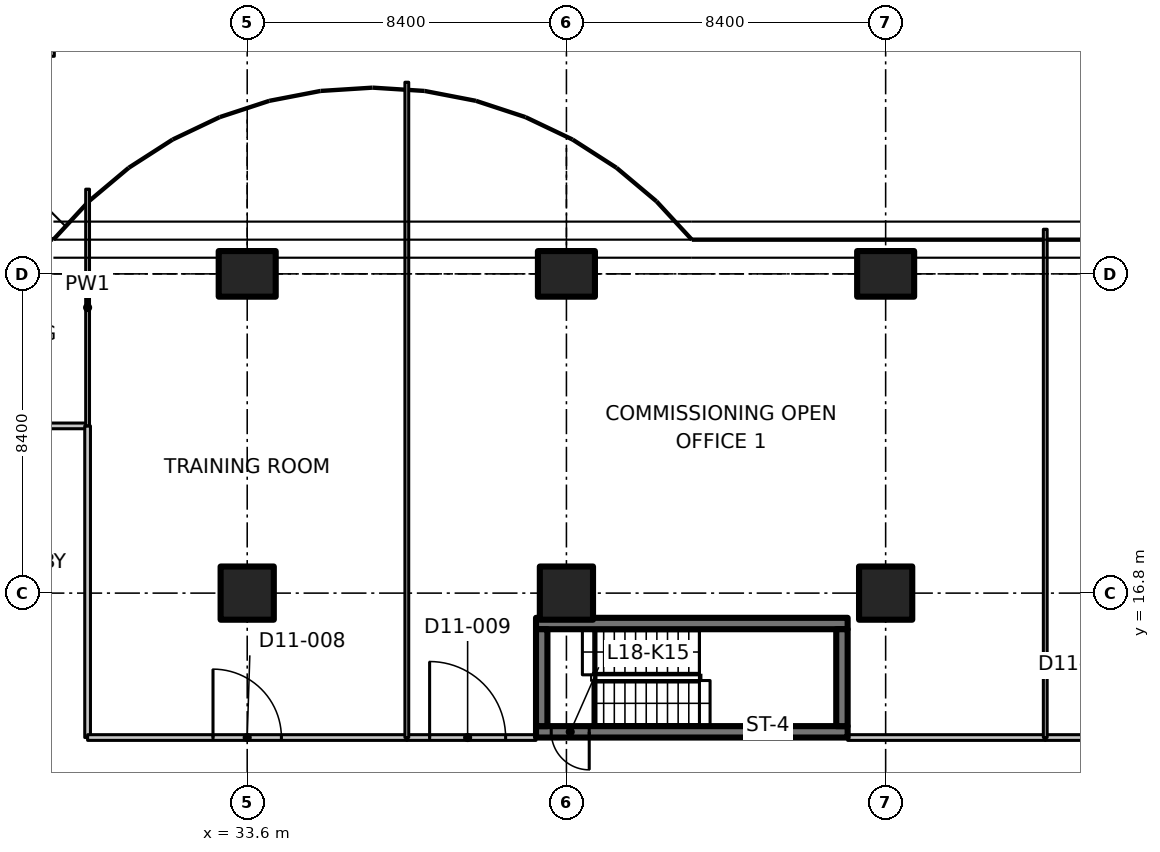
"""IFC4 building model, lengths in metres.
Left out: names, types, materials, properties, quantities, classifications, styles, units other than length and angle.
Written with IfcOpenShell. Run it as: python <this file> out.ifc"""

import sys

from ifc_helpers import new_model, si_unit, direction, frame, frame_2d, origin, origin_2d, place, context, subcontext, project, spatial, polyline, rectangle, outline, extrude, element, fill, save


model = new_model("IFC4")
c1 = context("Model", 3, precision=1e-05, world=origin(), true_north=direction((0.0, 1.0)))
c2 = subcontext(c1, "Body", "Model", "MODEL_VIEW")
j1 = project(units=[si_unit("LENGTHUNIT", "METRE"), si_unit("PLANEANGLEUNIT", "RADIAN")], contexts=[c1])
p1 = place(None, origin())
s1 = spatial("IfcSite", under=j1, at=p1, CompositionType="ELEMENT")
p2 = place(p1, origin())
s2 = spatial("IfcBuilding", under=s1, at=p2, CompositionType="ELEMENT")
p3 = place(p2, frame((0.0, 0.0, 79.7)))
s3 = spatial("IfcBuildingStorey", under=s2, at=p3, CompositionType="ELEMENT", Elevation=79.7)
p4 = place(p3, frame((33.6, 16.8, 0.0), z_axis=(0.0, 0.0, 1.0), x_axis=(1.0, 0.0, 0.0)))
e1 = element("IfcColumn", 1, at=p4, inside=s3, PredefinedType="COLUMN", context=c2, shape_type="SweptSolid", body=[
    extrude(rectangle(XDim=1.4, YDim=1.4, at=origin_2d()), origin(), (0.0, 0.0, 1.0), 3.35),
])
p5 = place(p3, frame((33.6, 25.2, 0.0), z_axis=(0.0, 0.0, 1.0), x_axis=(0.0, 1.0, 0.0)))
e2 = element("IfcColumn", 2, at=p5, inside=s3, PredefinedType="COLUMN", context=c2, shape_type="SweptSolid", body=[
    extrude(rectangle(XDim=1.2, YDim=1.5, at=origin_2d()), origin(), (0.0, 0.0, 1.0), 3.35),
])
p6 = place(p3, frame((42.0, 16.8, 0.0), z_axis=(0.0, 0.0, 1.0), x_axis=(1.0, 0.0, 0.0)))
e3 = element("IfcColumn", 3, at=p6, inside=s3, PredefinedType="COLUMN", context=c2, shape_type="SweptSolid", body=[
    extrude(rectangle(XDim=1.4, YDim=1.4, at=origin_2d()), origin(), (0.0, 0.0, 1.0), 3.35),
])
p7 = place(p3, frame((42.0, 25.2, 0.0), z_axis=(0.0, 0.0, 1.0), x_axis=(0.0, 1.0, 0.0)))
e4 = element("IfcColumn", 4, at=p7, inside=s3, PredefinedType="COLUMN", context=c2, shape_type="SweptSolid", body=[
    extrude(rectangle(XDim=1.2, YDim=1.5, at=origin_2d()), origin(), (0.0, 0.0, 1.0), 3.35),
])
p8 = place(p3, frame((50.4, 16.8, 0.0), z_axis=(0.0, 0.0, 1.0), x_axis=(1.0, 0.0, 0.0)))
e5 = element("IfcColumn", 5, at=p8, inside=s3, PredefinedType="COLUMN", context=c2, shape_type="SweptSolid", body=[
    extrude(rectangle(XDim=1.4, YDim=1.4, at=origin_2d()), origin(), (0.0, 0.0, 1.0), 3.35),
])
p9 = place(p3, frame((50.4, 25.2, 0.0), z_axis=(0.0, 0.0, 1.0), x_axis=(0.0, 1.0, 0.0)))
e6 = element("IfcColumn", 6, at=p9, inside=s3, PredefinedType="COLUMN", context=c2, shape_type="SweptSolid", body=[
    extrude(rectangle(XDim=1.2, YDim=1.5, at=origin_2d()), origin(), (0.0, 0.0, 1.0), 3.35),
])
p10 = place(p3, frame((49.4, 13.15, 0.0), z_axis=(0.0, 0.0, 1.0), x_axis=(-1.0, 0.0, 0.0)))
e7 = element("IfcWall", 7, at=p10, inside=s3, PredefinedType="SHEAR", context=c2, shape_type="SweptSolid", body=[
    extrude(rectangle(XDim=8.2, YDim=0.3, at=frame_2d((4.1, 0.0))), origin(), (0.0, 0.0, 1.0), 3.35),
])
p11 = place(p10, frame((6.8, 0.0, 0.0)))
e8 = element("IfcOpeningElement", 8, at=p11, cuts=e7, PredefinedType="OPENING", context=c2, shape_type="SweptSolid", body=[
    extrude(rectangle(XDim=1.0, YDim=2.1, at=frame_2d((0.5, 1.05))), frame((0.0, 0.16, 0.0), z_axis=(0.0, -1.0, 0.0), x_axis=(1.0, 0.0, 0.0)), (0.0, 0.0, 1.0), 0.32),
])
p12 = place(p3, frame((41.2, 16.0, 0.0), z_axis=(0.0, 0.0, 1.0), x_axis=(1.0, 0.0, 0.0)))
e9 = element("IfcWall", 9, at=p12, inside=s3, PredefinedType="SHEAR", context=c2, shape_type="SweptSolid", body=[
    extrude(rectangle(XDim=8.2, YDim=0.3, at=frame_2d((4.1, 0.0))), origin(), (0.0, 0.0, 1.0), 3.35),
])
for number, where, z_axis, x_axis in (
    (10, (41.35, 13.3, 0.0), (0.0, 0.0, 1.0), (0.0, 1.0, 0.0)),
    (11, (49.25, 13.3, 0.0), (0.0, 0.0, 1.0), (0.0, 1.0, 0.0)),
):
    element("IfcWall", number, at=place(p3, frame(where, z_axis=z_axis, x_axis=x_axis)), inside=s3, PredefinedType="SHEAR", context=c2, shape_type="SweptSolid", body=[
        extrude(rectangle(XDim=2.55, YDim=0.3, at=frame_2d((1.275, 0.0))), origin(), (0.0, 0.0, 1.0), 3.35),
    ])
p13 = place(p3, frame((25.2, 21.2, 0.0), z_axis=(0.0, 0.0, 1.0), x_axis=(1.0, 0.0, 0.0)))
e12 = element("IfcWall", 12, at=p13, inside=s3, PredefinedType="PARTITIONING", context=c2, shape_type="SweptSolid", body=[
    extrude(rectangle(XDim=4.2, YDim=0.15, at=frame_2d((2.1, 0.0))), origin(), (0.0, 0.0, 1.0), 3.33),
])
p14 = place(p3, frame((29.4, 21.2, 0.0), z_axis=(0.0, 0.0, 1.0), x_axis=(0.0, -1.0, 0.0)))
e13 = element("IfcWall", 13, at=p14, inside=s3, PredefinedType="PARTITIONING", context=c2, shape_type="SweptSolid", body=[
    extrude(rectangle(XDim=8.2, YDim=0.15, at=frame_2d((4.1, 0.0))), origin(), (0.0, 0.0, 1.0), 3.33),
])
p15 = place(p3, frame((29.4, 27.429, 0.0), z_axis=(0.0, 0.0, 1.0), x_axis=(0.0, -1.0, 0.0)))
e14 = element("IfcWall", 14, at=p15, inside=s3, PredefinedType="PARTITIONING", context=c2, shape_type="SweptSolid", body=[
    extrude(outline(polyline([(0.0, 0.0), (6.229, 0.0), (6.229, 3.33), (2.679, 3.33), (2.677, 2.98), (1.781, 2.98), (1.779, 3.33), (0.154, 3.33), (0.0, 3.33), (0.0, 0.0)])), frame((0.0, 0.05, 0.0), z_axis=(0.0, -1.0, 0.0), x_axis=(1.0, 0.0, 0.0)), (0.0, 0.0, 1.0), 0.1),
])
p16 = place(p3, frame((25.2, 31.0, 0.0), z_axis=(0.0, 0.0, 1.0), x_axis=(1.0, 0.0, 0.0)))
e15 = element("IfcWall", 15, at=p16, inside=s3, PredefinedType="PARTITIONING", context=c2, shape_type="SweptSolid", body=[
    extrude(rectangle(XDim=3.324, YDim=0.15, at=frame_2d((1.662, 0.0))), origin(), (0.0, 0.0, 1.0), 2.98),
])
p17 = place(p3, frame((29.4, 13.0, 0.0), z_axis=(0.0, 0.0, 1.0), x_axis=(1.0, 0.0, 0.0)))
e16 = element("IfcWall", 16, at=p17, inside=s3, PredefinedType="PARTITIONING", context=c2, shape_type="SweptSolid", body=[
    extrude(rectangle(XDim=8.4, YDim=0.15, at=frame_2d((4.2, 0.0))), origin(), (0.0, 0.0, 1.0), 3.33),
])
p18 = place(p17, frame((3.3, 0.0, 0.0)))
e17 = element("IfcOpeningElement", 17, at=p18, cuts=e16, PredefinedType="OPENING", context=c2, shape_type="SweptSolid", body=[
    extrude(rectangle(XDim=1.8, YDim=2.1, at=frame_2d((0.9, 1.05))), frame((0.0, 0.085, 0.0), z_axis=(0.0, -1.0, 0.0), x_axis=(1.0, 0.0, 0.0)), (0.0, 0.0, 1.0), 0.17),
])
p19 = place(p3, frame((37.8, 13.0, 0.0), z_axis=(0.0, 0.0, 1.0), x_axis=(1.0, 0.0, 0.0)))
e18 = element("IfcWall", 18, at=p19, inside=s3, PredefinedType="PARTITIONING", context=c2, shape_type="SweptSolid", body=[
    extrude(rectangle(XDim=3.4, YDim=0.15, at=frame_2d((1.7, 0.0))), origin(), (0.0, 0.0, 1.0), 3.33),
])
p20 = place(p19, frame((0.6, 0.0, 0.0)))
e19 = element("IfcOpeningElement", 19, at=p20, cuts=e18, PredefinedType="OPENING", context=c2, shape_type="SweptSolid", body=[
    extrude(rectangle(XDim=2.0, YDim=2.4, at=frame_2d((1.0, 1.2))), frame((0.0, 0.085, 0.0), z_axis=(0.0, -1.0, 0.0), x_axis=(1.0, 0.0, 0.0)), (0.0, 0.0, 1.0), 0.17),
])
p21 = place(p3, frame((49.4, 13.0, 0.0), z_axis=(0.0, 0.0, 1.0), x_axis=(1.0, 0.0, 0.0)))
e20 = element("IfcWall", 20, at=p21, inside=s3, PredefinedType="PARTITIONING", context=c2, shape_type="SweptSolid", body=[
    extrude(rectangle(XDim=5.2, YDim=0.15, at=frame_2d((2.6, 0.0))), origin(), (0.0, 0.0, 1.0), 3.33),
])
p22 = place(p3, frame((54.6, 13.0, 0.0), z_axis=(0.0, 0.0, 1.0), x_axis=(1.0, 0.0, 0.0)))
e21 = element("IfcWall", 21, at=p22, inside=s3, PredefinedType="PARTITIONING", context=c2, shape_type="SweptSolid", body=[
    extrude(rectangle(XDim=4.2, YDim=0.15, at=frame_2d((2.1, 0.0))), origin(), (0.0, 0.0, 1.0), 3.33),
])
p23 = place(p22, frame((1.5, 0.0, 0.0)))
e22 = element("IfcOpeningElement", 22, at=p23, cuts=e21, PredefinedType="OPENING", context=c2, shape_type="SweptSolid", body=[
    extrude(rectangle(XDim=1.1, YDim=2.1, at=frame_2d((0.55, 1.05))), frame((0.0, 0.085, 0.0), z_axis=(0.0, -1.0, 0.0), x_axis=(1.0, 0.0, 0.0)), (0.0, 0.0, 1.0), 0.17),
])
p24 = place(p3, frame((37.8, 30.243, 0.0), z_axis=(0.0, 0.0, 1.0), x_axis=(0.0, -1.0, 0.0)))
e23 = element("IfcWall", 23, at=p24, inside=s3, PredefinedType="PARTITIONING", context=c2, shape_type="SweptSolid", body=[
    extrude(outline(polyline([(0.0, 0.0), (17.243, 0.0), (17.243, 3.33), (5.493, 3.33), (5.491, 2.98), (4.595, 2.98), (4.593, 3.33), (0.0, 3.33), (0.0, 0.0)])), frame((0.0, 0.05, 0.0), z_axis=(0.0, -1.0, 0.0), x_axis=(1.0, 0.0, 0.0)), (0.0, 0.0, 1.0), 0.1),
])
p25 = place(p3, frame((54.6, 26.374, 0.0), z_axis=(0.0, 0.0, 1.0), x_axis=(0.0, -1.0, 0.0)))
e24 = element("IfcWall", 24, at=p25, inside=s3, PredefinedType="PARTITIONING", context=c2, shape_type="SweptSolid", body=[
    extrude(outline(polyline([(0.0, 0.0), (13.374, 0.0), (13.374, 3.33), (1.624, 3.33), (1.622, 2.98), (0.726, 2.98), (0.724, 3.33), (0.074, 3.33), (0.0, 3.33), (0.0, 0.0)])), frame((0.0, 0.05, 0.0), z_axis=(0.0, -1.0, 0.0), x_axis=(1.0, 0.0, 0.0)), (0.0, 0.0, 1.0), 0.1),
])
p26 = place(p11, origin())
e25 = element("IfcDoor", 25, at=p26, inside=s3, OperationType="SINGLE_SWING_LEFT", PredefinedType="DOOR", context=c2, shape_type="SweptSolid", body=[
    extrude(rectangle(XDim=1.0, YDim=2.1, at=frame_2d((0.5, 1.05))), frame((0.0, 0.025, 0.0), z_axis=(0.0, -1.0, 0.0), x_axis=(1.0, 0.0, 0.0)), (0.0, 0.0, 1.0), 0.05),
])
fill(e8, e25)
p27 = place(p18, origin())
e26 = element("IfcDoor", 26, at=p27, inside=s3, OperationType="DOUBLE_DOOR_SINGLE_SWING", PredefinedType="DOOR", context=c2, shape_type="SweptSolid", body=[
    extrude(rectangle(XDim=1.8, YDim=2.1, at=frame_2d((0.9, 1.05))), frame((0.0, 0.025, 0.0), z_axis=(0.0, -1.0, 0.0), x_axis=(1.0, 0.0, 0.0)), (0.0, 0.0, 1.0), 0.05),
])
fill(e17, e26)
p28 = place(p20, origin())
e27 = element("IfcDoor", 27, at=p28, inside=s3, OperationType="DOUBLE_DOOR_SINGLE_SWING", PredefinedType="DOOR", context=c2, shape_type="SweptSolid", body=[
    extrude(rectangle(XDim=2.0, YDim=2.4, at=frame_2d((1.0, 1.2))), frame((0.0, 0.025, 0.0), z_axis=(0.0, -1.0, 0.0), x_axis=(1.0, 0.0, 0.0)), (0.0, 0.0, 1.0), 0.05),
])
fill(e19, e27)
save(model, sys.argv[1])
